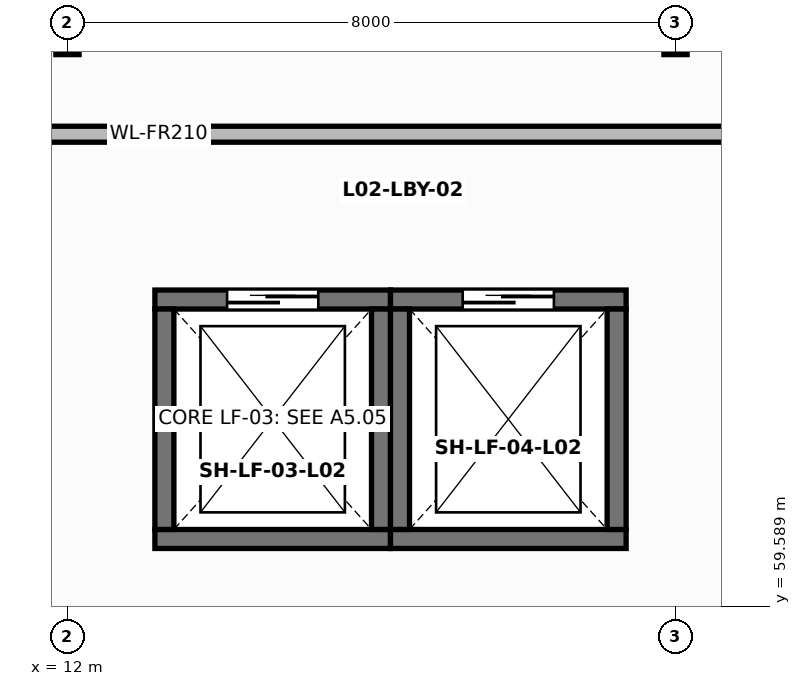
"""IFC4 building model, lengths in metres.
Left out: names, types, materials, properties, quantities, classifications, styles, units other than length and angle.
Written with IfcOpenShell. Run it as: python <this file> out.ifc"""

import sys

from ifc_helpers import new_model, si_unit, direction, frame, frame_2d, origin, origin_2d, place, context, subcontext, project, spatial, rectangle, hollow_rectangle, extrude, element, fill, save


model = new_model("IFC4")
c1 = context("Model", 3, precision=1e-05, world=origin(), true_north=direction((0.0, 1.0)))
c2 = subcontext(c1, "Body", "Model", "MODEL_VIEW")
j1 = project(units=[si_unit("LENGTHUNIT", "METRE"), si_unit("PLANEANGLEUNIT", "RADIAN")], contexts=[c1])
p1 = place(None, origin())
s1 = spatial("IfcSite", under=j1, at=p1, CompositionType="ELEMENT")
p2 = place(p1, origin())
s2 = spatial("IfcBuilding", under=s1, at=p2, CompositionType="ELEMENT")
p3 = place(p2, frame((0.0, 0.0, 11.2)))
s3 = spatial("IfcBuildingStorey", under=s2, at=p3, CompositionType="ELEMENT", Elevation=11.2)
p4 = place(p3, frame((12.0, 67.0, 0.0), z_axis=(0.0, 0.0, 1.0), x_axis=(1.0, 0.0, 0.0)))
e1 = element("IfcColumn", 1, at=p4, inside=s3, PredefinedType="COLUMN", context=c2, shape_type="SweptSolid", body=[
    extrude(hollow_rectangle(XDim=0.305, YDim=0.305, WallThickness=0.012, at=origin_2d()), origin(), (0.0, 0.0, 1.0), 6.15),
])
p5 = place(p3, frame((20.0, 67.0, 0.0), z_axis=(0.0, 0.0, 1.0), x_axis=(1.0, 0.0, 0.0)))
e2 = element("IfcColumn", 2, at=p5, inside=s3, PredefinedType="COLUMN", context=c2, shape_type="SweptSolid", body=[
    extrude(hollow_rectangle(XDim=0.305, YDim=0.305, WallThickness=0.012, at=origin_2d()), origin(), (0.0, 0.0, 1.0), 4.3),
])
p6 = place(p3, frame((13.15, 60.475, 0.0), z_axis=(0.0, 0.0, 1.0), x_axis=(1.0, 0.0, 0.0)))
e3 = element("IfcWall", 3, at=p6, inside=s3, PredefinedType="SOLIDWALL", context=c2, shape_type="SweptSolid", body=[
    extrude(rectangle(XDim=3.1, YDim=0.25, at=frame_2d((1.55, 0.0))), origin(), (0.0, 0.0, 1.0), 3.87),
])
p7 = place(p3, frame((16.25, 63.625, 0.0), z_axis=(0.0, 0.0, 1.0), x_axis=(-1.0, 0.0, 0.0)))
e4 = element("IfcWall", 4, at=p7, inside=s3, PredefinedType="SOLIDWALL", context=c2, shape_type="SweptSolid", body=[
    extrude(rectangle(XDim=3.1, YDim=0.25, at=frame_2d((1.55, 0.0))), origin(), (0.0, 0.0, 1.0), 3.87),
])
p8 = place(p7, frame((0.95, 0.0, 0.0)))
e5 = element("IfcOpeningElement", 5, at=p8, cuts=e4, PredefinedType="OPENING", context=c2, shape_type="SweptSolid", body=[
    extrude(rectangle(XDim=1.2, YDim=2.2, at=frame_2d((0.6, 1.1))), frame((0.0, 0.135, 0.0), z_axis=(0.0, -1.0, 0.0), x_axis=(1.0, 0.0, 0.0)), (0.0, 0.0, 1.0), 0.27),
])
for number, where, z_axis, x_axis in (
    (6, (16.125, 60.6, 0.0), (0.0, 0.0, 1.0), (0.0, 1.0, 0.0)),
    (7, (13.275, 63.5, 0.0), (0.0, 0.0, 1.0), (0.0, -1.0, 0.0)),
):
    element("IfcWall", number, at=place(p3, frame(where, z_axis=z_axis, x_axis=x_axis)), inside=s3, PredefinedType="SOLIDWALL", context=c2, shape_type="SweptSolid", body=[
        extrude(rectangle(XDim=2.9, YDim=0.25, at=frame_2d((1.45, 0.0))), origin(), (0.0, 0.0, 1.0), 3.87),
    ])
p9 = place(p3, frame((16.25, 60.475, 0.0), z_axis=(0.0, 0.0, 1.0), x_axis=(1.0, 0.0, 0.0)))
e8 = element("IfcWall", 8, at=p9, inside=s3, PredefinedType="SOLIDWALL", context=c2, shape_type="SweptSolid", body=[
    extrude(rectangle(XDim=3.1, YDim=0.25, at=frame_2d((1.55, 0.0))), origin(), (0.0, 0.0, 1.0), 3.87),
])
p10 = place(p3, frame((19.35, 63.625, 0.0), z_axis=(0.0, 0.0, 1.0), x_axis=(-1.0, 0.0, 0.0)))
e9 = element("IfcWall", 9, at=p10, inside=s3, PredefinedType="SOLIDWALL", context=c2, shape_type="SweptSolid", body=[
    extrude(rectangle(XDim=3.1, YDim=0.25, at=frame_2d((1.55, 0.0))), origin(), (0.0, 0.0, 1.0), 3.87),
])
p11 = place(p10, frame((0.95, 0.0, 0.0)))
e10 = element("IfcOpeningElement", 10, at=p11, cuts=e9, PredefinedType="OPENING", context=c2, shape_type="SweptSolid", body=[
    extrude(rectangle(XDim=1.2, YDim=2.2, at=frame_2d((0.6, 1.1))), frame((0.0, 0.135, 0.0), z_axis=(0.0, -1.0, 0.0), x_axis=(1.0, 0.0, 0.0)), (0.0, 0.0, 1.0), 0.27),
])
for number, where, z_axis, x_axis in (
    (11, (19.225, 60.6, 0.0), (0.0, 0.0, 1.0), (0.0, 1.0, 0.0)),
    (12, (16.375, 63.5, 0.0), (0.0, 0.0, 1.0), (0.0, -1.0, 0.0)),
):
    element("IfcWall", number, at=place(p3, frame(where, z_axis=z_axis, x_axis=x_axis)), inside=s3, PredefinedType="SOLIDWALL", context=c2, shape_type="SweptSolid", body=[
        extrude(rectangle(XDim=2.9, YDim=0.25, at=frame_2d((1.45, 0.0))), origin(), (0.0, 0.0, 1.0), 3.87),
    ])
p12 = place(p3, frame((5.505, 65.8, 0.0), z_axis=(0.0, 0.0, 1.0), x_axis=(1.0, 0.0, 0.0)))
e13 = element("IfcWall", 13, at=p12, inside=s3, PredefinedType="SOLIDWALL", context=c2, shape_type="SweptSolid", body=[
    extrude(rectangle(XDim=15.39, YDim=0.21, at=frame_2d((7.695, 0.0))), origin(), (0.0, 0.0, 1.0), 4.12),
])
p13 = place(p8, frame((1.2, 0.0, 0.0), z_axis=(0.0, 0.0, 1.0), x_axis=(-1.0, 0.0, 0.0)))
e14 = element("IfcDoor", 14, at=p13, inside=s3, OperationType="DOUBLE_DOOR_SLIDING", PredefinedType="DOOR", context=c2, shape_type="SweptSolid", body=[
    extrude(rectangle(XDim=1.2, YDim=2.2, at=frame_2d((0.6, 1.1))), frame((0.0, 0.025, 0.0), z_axis=(0.0, -1.0, 0.0), x_axis=(1.0, 0.0, 0.0)), (0.0, 0.0, 1.0), 0.05),
])
fill(e5, e14)
p14 = place(p11, frame((1.2, 0.0, 0.0), z_axis=(0.0, 0.0, 1.0), x_axis=(-1.0, 0.0, 0.0)))
e15 = element("IfcDoor", 15, at=p14, inside=s3, OperationType="DOUBLE_DOOR_SLIDING", PredefinedType="DOOR", context=c2, shape_type="SweptSolid", body=[
    extrude(rectangle(XDim=1.2, YDim=2.2, at=frame_2d((0.6, 1.1))), frame((0.0, 0.025, 0.0), z_axis=(0.0, -1.0, 0.0), x_axis=(1.0, 0.0, 0.0)), (0.0, 0.0, 1.0), 0.05),
])
fill(e10, e15)
save(model, sys.argv[1])
